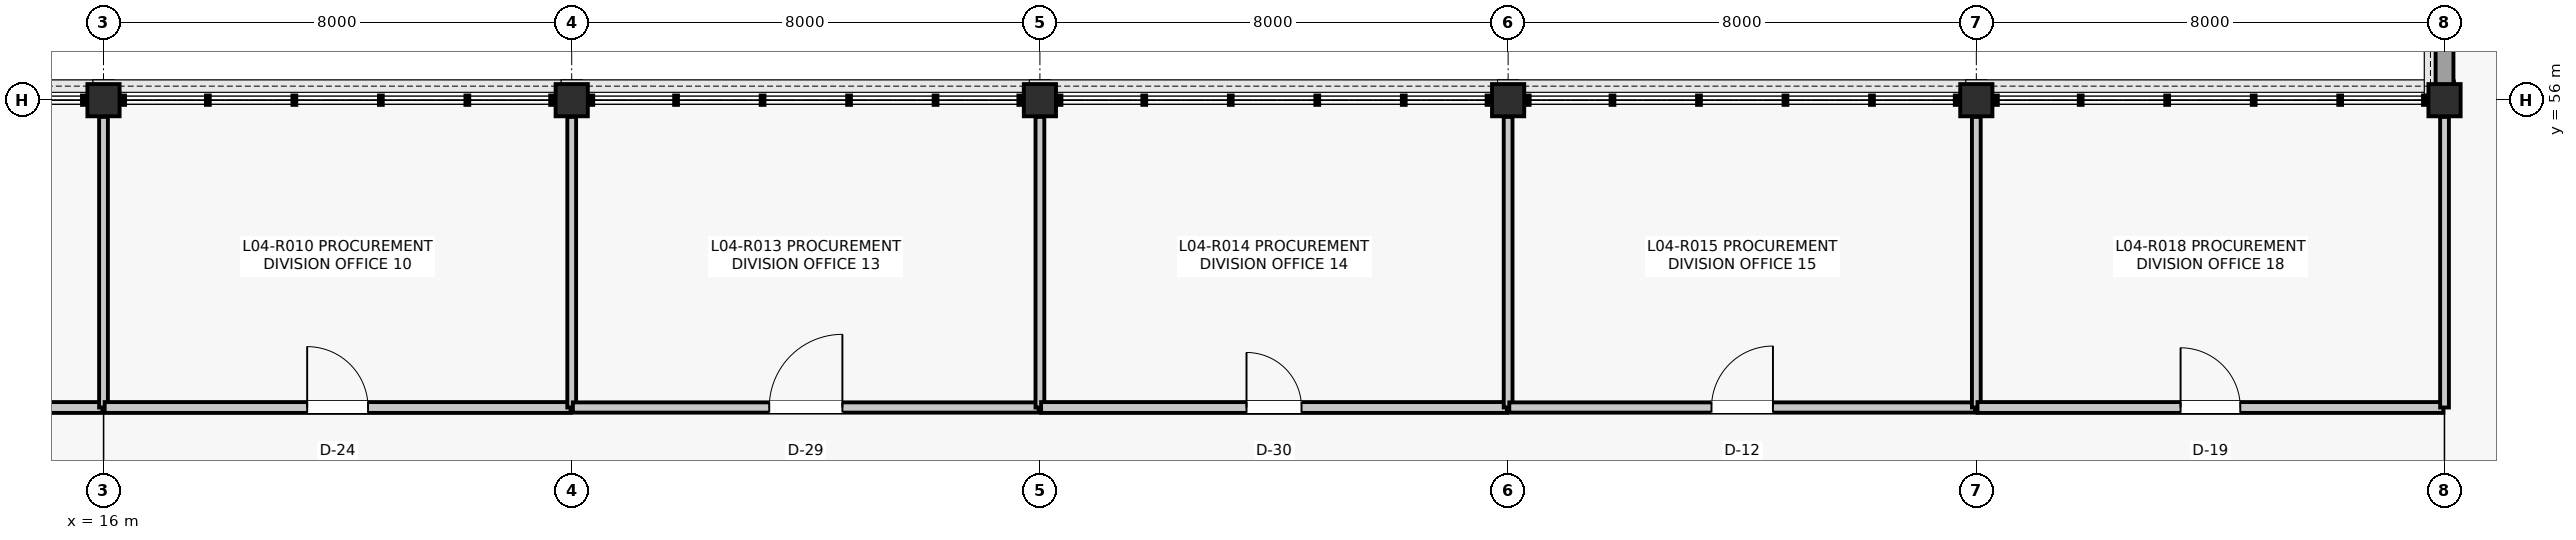
"""IFC4 building model, lengths in metres.
Left out: names, types, materials, properties, quantities, classifications, styles, units other than length and angle.
Written with IfcOpenShell. Run it as: python <this file> out.ifc"""

import sys

from ifc_helpers import new_model, si_unit, direction, frame, frame_2d, origin, origin_2d, place, context, subcontext, project, spatial, rectangle, extrude, element, fill, save


model = new_model("IFC4")
c1 = context("Model", 3, precision=1e-05, world=origin(), true_north=direction((0.0, 1.0)))
c2 = subcontext(c1, "Body", "Model", "MODEL_VIEW")
j1 = project(units=[si_unit("LENGTHUNIT", "METRE"), si_unit("PLANEANGLEUNIT", "RADIAN")], contexts=[c1])
p1 = place(None, origin())
s1 = spatial("IfcSite", under=j1, at=p1, CompositionType="ELEMENT")
p2 = place(p1, origin())
s2 = spatial("IfcBuilding", under=s1, at=p2, CompositionType="ELEMENT")
p3 = place(p2, frame((0.0, 0.0, 17.82)))
s3 = spatial("IfcBuildingStorey", under=s2, at=p3, CompositionType="ELEMENT", Elevation=17.82)
for number, where, z_axis, x_axis in (
    (1, (16.0, 56.0, 0.0), (0.0, 0.0, 1.0), (1.0, 0.0, 0.0)),
    (2, (24.0, 56.0, 0.0), (0.0, 0.0, 1.0), (1.0, 0.0, 0.0)),
    (3, (32.0, 56.0, 0.0), (0.0, 0.0, 1.0), (1.0, 0.0, 0.0)),
    (4, (40.0, 56.0, 0.0), (0.0, 0.0, 1.0), (1.0, 0.0, 0.0)),
    (5, (48.0, 56.0, 0.0), (0.0, 0.0, 1.0), (1.0, 0.0, 0.0)),
    (6, (56.0, 56.0, 0.0), (0.0, 0.0, 1.0), (1.0, 0.0, 0.0)),
):
    element("IfcColumn", number, at=place(p3, frame(where, z_axis=z_axis, x_axis=x_axis)), inside=s3, PredefinedType="COLUMN", context=c2, shape_type="SweptSolid", body=[
        extrude(rectangle(XDim=0.55, YDim=0.55, at=origin_2d()), origin(), (0.0, 0.0, 1.0), 3.96),
    ])
p4 = place(p3, frame((56.0, 56.26, 0.0), z_axis=(0.0, 0.0, 1.0), x_axis=(0.0, 1.0, 0.0)))
e7 = element("IfcWall", 7, at=p4, inside=s3, PredefinedType="SOLIDWALL", context=c2, shape_type="SweptSolid", body=[
    extrude(rectangle(XDim=7.48, YDim=0.305, at=frame_2d((3.74, 0.0))), origin(), (0.0, 0.0, 1.0), 3.289),
])
p5 = place(p4, frame((0.771, 0.0, 0.95)))
e8 = element("IfcOpeningElement", 8, at=p5, cuts=e7, PredefinedType="OPENING", context=c2, shape_type="SweptSolid", body=[
    extrude(rectangle(XDim=1.15, YDim=1.65, at=frame_2d((0.575, 0.825))), frame((0.0, 0.162, 0.0), z_axis=(0.0, -1.0, 0.0), x_axis=(1.0, 0.0, 0.0)), (0.0, 0.0, 1.0), 0.325),
])
p6 = place(p4, frame((5.559, 0.0, 0.95)))
e9 = element("IfcOpeningElement", 9, at=p6, cuts=e7, PredefinedType="OPENING", context=c2, shape_type="SweptSolid", body=[
    extrude(rectangle(XDim=1.15, YDim=1.65, at=frame_2d((0.575, 0.825))), frame((0.0, 0.162, 0.0), z_axis=(0.0, -1.0, 0.0), x_axis=(1.0, 0.0, 0.0)), (0.0, 0.0, 1.0), 0.325),
])
p7 = place(p3, frame((8.02, 50.75, 0.0), z_axis=(0.0, 0.0, 1.0), x_axis=(1.0, 0.0, 0.0)))
e10 = element("IfcWall", 10, at=p7, inside=s3, PredefinedType="PARTITIONING", context=c2, shape_type="SweptSolid", body=[
    extrude(rectangle(XDim=7.96, YDim=0.185, at=frame_2d((3.98, 0.0))), origin(), (0.0, 0.0, 1.0), 3.238),
])
p8 = place(p7, frame((3.47, 0.0, 0.0)))
e11 = element("IfcOpeningElement", 11, at=p8, cuts=e10, PredefinedType="OPENING", context=c2, shape_type="SweptSolid", body=[
    extrude(rectangle(XDim=1.02, YDim=2.2, at=frame_2d((0.51, 1.1))), frame((0.0, 0.103, 0.0), z_axis=(0.0, -1.0, 0.0), x_axis=(1.0, 0.0, 0.0)), (0.0, 0.0, 1.0), 0.205),
])
p9 = place(p3, frame((16.0, 50.75, 0.0), z_axis=(0.0, 0.0, 1.0), x_axis=(0.0, 1.0, 0.0)))
e12 = element("IfcWall", 12, at=p9, inside=s3, PredefinedType="PARTITIONING", context=c2, shape_type="SweptSolid", body=[
    extrude(rectangle(XDim=4.965, YDim=0.15, at=frame_2d((2.482, 0.0))), origin(), (0.0, 0.0, 1.0), 3.437),
])
p10 = place(p3, frame((16.02, 50.75, 0.0), z_axis=(0.0, 0.0, 1.0), x_axis=(1.0, 0.0, 0.0)))
e13 = element("IfcWall", 13, at=p10, inside=s3, PredefinedType="PARTITIONING", context=c2, shape_type="SweptSolid", body=[
    extrude(rectangle(XDim=7.96, YDim=0.185, at=frame_2d((3.98, 0.0))), origin(), (0.0, 0.0, 1.0), 3.232),
])
p11 = place(p10, frame((3.46, 0.0, 0.0)))
e14 = element("IfcOpeningElement", 14, at=p11, cuts=e13, PredefinedType="OPENING", context=c2, shape_type="SweptSolid", body=[
    extrude(rectangle(XDim=1.04, YDim=2.18, at=frame_2d((0.52, 1.09))), frame((0.0, 0.103, 0.0), z_axis=(0.0, -1.0, 0.0), x_axis=(1.0, 0.0, 0.0)), (0.0, 0.0, 1.0), 0.205),
])
p12 = place(p3, frame((24.0, 50.75, 0.0), z_axis=(0.0, 0.0, 1.0), x_axis=(0.0, 1.0, 0.0)))
e15 = element("IfcWall", 15, at=p12, inside=s3, PredefinedType="PARTITIONING", context=c2, shape_type="SweptSolid", body=[
    extrude(rectangle(XDim=4.965, YDim=0.15, at=frame_2d((2.482, 0.0))), origin(), (0.0, 0.0, 1.0), 3.232),
])
p13 = place(p3, frame((24.02, 50.75, 0.0), z_axis=(0.0, 0.0, 1.0), x_axis=(1.0, 0.0, 0.0)))
e16 = element("IfcWall", 16, at=p13, inside=s3, PredefinedType="PARTITIONING", context=c2, shape_type="SweptSolid", body=[
    extrude(rectangle(XDim=7.96, YDim=0.175, at=frame_2d((3.98, 0.0))), origin(), (0.0, 0.0, 1.0), 3.232),
])
p14 = place(p13, frame((3.355, 0.0, 0.0)))
e17 = element("IfcOpeningElement", 17, at=p14, cuts=e16, PredefinedType="OPENING", context=c2, shape_type="SweptSolid", body=[
    extrude(rectangle(XDim=1.25, YDim=2.18, at=frame_2d((0.625, 1.09))), frame((0.0, 0.097, 0.0), z_axis=(0.0, -1.0, 0.0), x_axis=(1.0, 0.0, 0.0)), (0.0, 0.0, 1.0), 0.195),
])
p15 = place(p3, frame((32.0, 50.75, 0.0), z_axis=(0.0, 0.0, 1.0), x_axis=(0.0, 1.0, 0.0)))
e18 = element("IfcWall", 18, at=p15, inside=s3, PredefinedType="PARTITIONING", context=c2, shape_type="SweptSolid", body=[
    extrude(rectangle(XDim=4.965, YDim=0.15, at=frame_2d((2.482, 0.0))), origin(), (0.0, 0.0, 1.0), 3.238),
])
p16 = place(p3, frame((32.02, 50.75, 0.0), z_axis=(0.0, 0.0, 1.0), x_axis=(1.0, 0.0, 0.0)))
e19 = element("IfcWall", 19, at=p16, inside=s3, PredefinedType="PARTITIONING", context=c2, shape_type="SweptSolid", body=[
    extrude(rectangle(XDim=7.96, YDim=0.185, at=frame_2d((3.98, 0.0))), origin(), (0.0, 0.0, 1.0), 3.238),
])
p17 = place(p16, frame((3.51, 0.0, 0.0)))
e20 = element("IfcOpeningElement", 20, at=p17, cuts=e19, PredefinedType="OPENING", context=c2, shape_type="SweptSolid", body=[
    extrude(rectangle(XDim=0.94, YDim=2.12, at=frame_2d((0.47, 1.06))), frame((0.0, 0.103, 0.0), z_axis=(0.0, -1.0, 0.0), x_axis=(1.0, 0.0, 0.0)), (0.0, 0.0, 1.0), 0.205),
])
p18 = place(p3, frame((40.0, 50.75, 0.0), z_axis=(0.0, 0.0, 1.0), x_axis=(0.0, 1.0, 0.0)))
e21 = element("IfcWall", 21, at=p18, inside=s3, PredefinedType="PARTITIONING", context=c2, shape_type="SweptSolid", body=[
    extrude(rectangle(XDim=4.965, YDim=0.15, at=frame_2d((2.482, 0.0))), origin(), (0.0, 0.0, 1.0), 3.437),
])
p19 = place(p3, frame((40.02, 50.75, 0.0), z_axis=(0.0, 0.0, 1.0), x_axis=(1.0, 0.0, 0.0)))
e22 = element("IfcWall", 22, at=p19, inside=s3, PredefinedType="PARTITIONING", context=c2, shape_type="SweptSolid", body=[
    extrude(rectangle(XDim=7.96, YDim=0.175, at=frame_2d((3.98, 0.0))), origin(), (0.0, 0.0, 1.0), 3.232),
])
p20 = place(p19, frame((3.455, 0.0, 0.0)))
e23 = element("IfcOpeningElement", 23, at=p20, cuts=e22, PredefinedType="OPENING", context=c2, shape_type="SweptSolid", body=[
    extrude(rectangle(XDim=1.05, YDim=2.15, at=frame_2d((0.525, 1.075))), frame((0.0, 0.097, 0.0), z_axis=(0.0, -1.0, 0.0), x_axis=(1.0, 0.0, 0.0)), (0.0, 0.0, 1.0), 0.195),
])
p21 = place(p3, frame((48.0, 50.75, 0.0), z_axis=(0.0, 0.0, 1.0), x_axis=(0.0, 1.0, 0.0)))
e24 = element("IfcWall", 24, at=p21, inside=s3, PredefinedType="PARTITIONING", context=c2, shape_type="SweptSolid", body=[
    extrude(rectangle(XDim=4.965, YDim=0.15, at=frame_2d((2.482, 0.0))), origin(), (0.0, 0.0, 1.0), 3.232),
])
p22 = place(p3, frame((48.02, 50.75, 0.0), z_axis=(0.0, 0.0, 1.0), x_axis=(1.0, 0.0, 0.0)))
e25 = element("IfcWall", 25, at=p22, inside=s3, PredefinedType="PARTITIONING", context=c2, shape_type="SweptSolid", body=[
    extrude(rectangle(XDim=7.96, YDim=0.185, at=frame_2d((3.98, 0.0))), origin(), (0.0, 0.0, 1.0), 3.232),
])
p23 = place(p22, frame((3.47, 0.0, 0.0)))
e26 = element("IfcOpeningElement", 26, at=p23, cuts=e25, PredefinedType="OPENING", context=c2, shape_type="SweptSolid", body=[
    extrude(rectangle(XDim=1.02, YDim=2.2, at=frame_2d((0.51, 1.1))), frame((0.0, 0.103, 0.0), z_axis=(0.0, -1.0, 0.0), x_axis=(1.0, 0.0, 0.0)), (0.0, 0.0, 1.0), 0.205),
])
p24 = place(p3, frame((56.0, 50.75, 0.0), z_axis=(0.0, 0.0, 1.0), x_axis=(0.0, 1.0, 0.0)))
e27 = element("IfcWall", 27, at=p24, inside=s3, PredefinedType="PARTITIONING", context=c2, shape_type="SweptSolid", body=[
    extrude(rectangle(XDim=4.965, YDim=0.15, at=frame_2d((2.482, 0.0))), origin(), (0.0, 0.0, 1.0), 3.238),
])
p25 = place(p11, origin())
e28 = element("IfcDoor", 28, at=p25, inside=s3, OperationType="SINGLE_SWING_LEFT", PredefinedType="DOOR", context=c2, shape_type="SweptSolid", body=[
    extrude(rectangle(XDim=1.04, YDim=2.18, at=frame_2d((0.52, 1.09))), frame((0.0, 0.025, 0.0), z_axis=(0.0, -1.0, 0.0), x_axis=(1.0, 0.0, 0.0)), (0.0, 0.0, 1.0), 0.05),
])
fill(e14, e28)
p26 = place(p14, origin())
e29 = element("IfcDoor", 29, at=p26, inside=s3, OperationType="SINGLE_SWING_RIGHT", PredefinedType="DOOR", context=c2, shape_type="SweptSolid", body=[
    extrude(rectangle(XDim=1.25, YDim=2.18, at=frame_2d((0.625, 1.09))), frame((0.0, 0.025, 0.0), z_axis=(0.0, -1.0, 0.0), x_axis=(1.0, 0.0, 0.0)), (0.0, 0.0, 1.0), 0.05),
])
fill(e17, e29)
p27 = place(p17, origin())
e30 = element("IfcDoor", 30, at=p27, inside=s3, OperationType="SINGLE_SWING_LEFT", PredefinedType="DOOR", context=c2, shape_type="SweptSolid", body=[
    extrude(rectangle(XDim=0.94, YDim=2.12, at=frame_2d((0.47, 1.06))), frame((0.0, 0.025, 0.0), z_axis=(0.0, -1.0, 0.0), x_axis=(1.0, 0.0, 0.0)), (0.0, 0.0, 1.0), 0.05),
])
fill(e20, e30)
p28 = place(p20, origin())
e31 = element("IfcDoor", 31, at=p28, inside=s3, OperationType="SINGLE_SWING_RIGHT", PredefinedType="DOOR", context=c2, shape_type="SweptSolid", body=[
    extrude(rectangle(XDim=1.05, YDim=2.15, at=frame_2d((0.525, 1.075))), frame((0.0, 0.025, 0.0), z_axis=(0.0, -1.0, 0.0), x_axis=(1.0, 0.0, 0.0)), (0.0, 0.0, 1.0), 0.05),
])
fill(e23, e31)
p29 = place(p23, origin())
e32 = element("IfcDoor", 32, at=p29, inside=s3, OperationType="SINGLE_SWING_LEFT", PredefinedType="DOOR", context=c2, shape_type="SweptSolid", body=[
    extrude(rectangle(XDim=1.02, YDim=2.2, at=frame_2d((0.51, 1.1))), frame((0.0, 0.025, 0.0), z_axis=(0.0, -1.0, 0.0), x_axis=(1.0, 0.0, 0.0)), (0.0, 0.0, 1.0), 0.05),
])
fill(e26, e32)
save(model, sys.argv[1])
